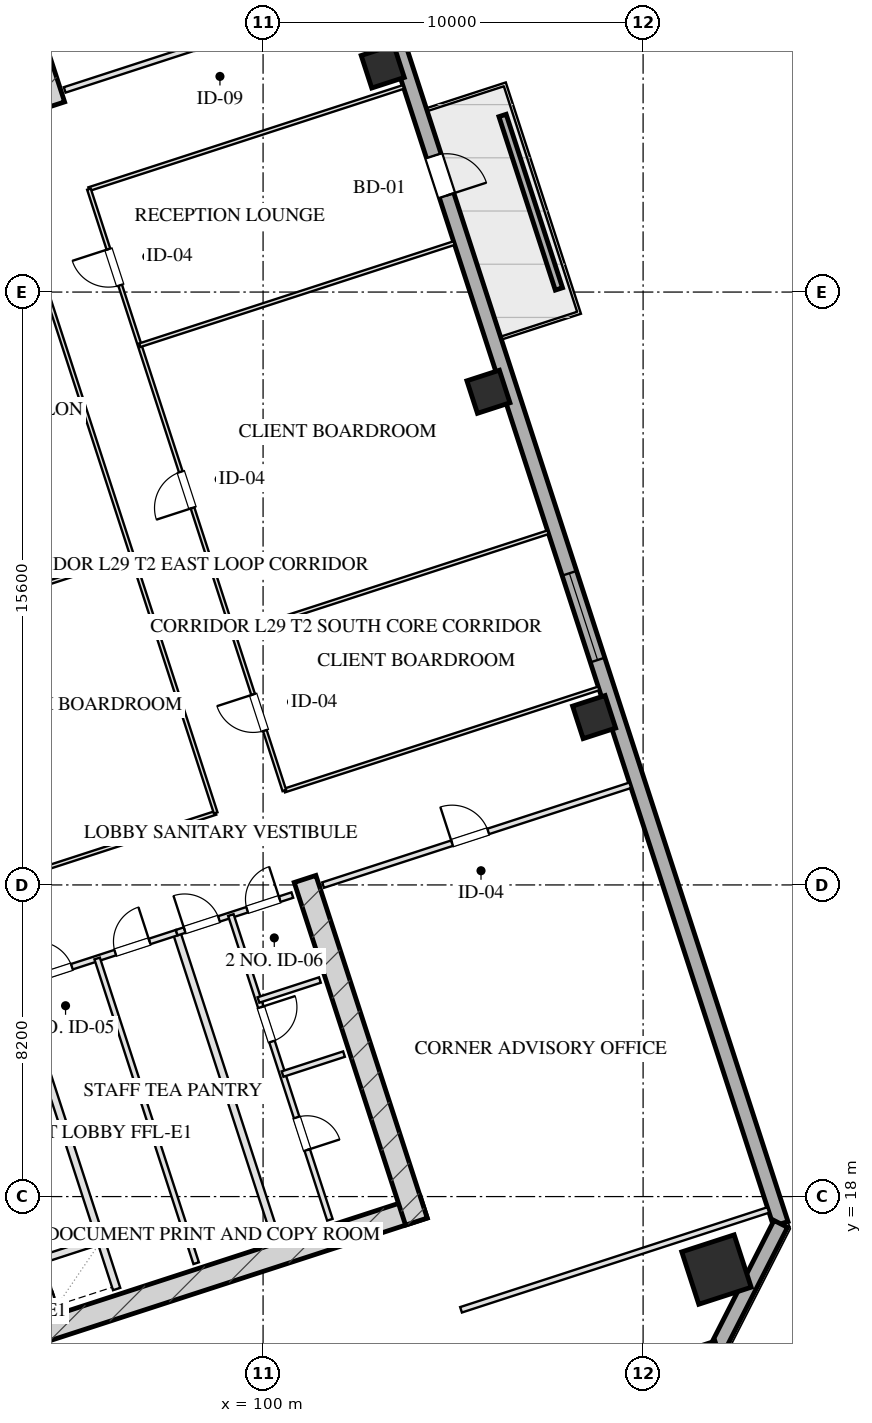
"""IFC4 building model, lengths in metres.
Left out: names, types, materials, properties, quantities, classifications, styles, units other than length and angle.
Written with IfcOpenShell. Run it as: python <this file> out.ifc"""

import sys

from ifc_helpers import new_model, si_unit, direction, frame, frame_2d, origin, origin_2d, place, context, subcontext, project, spatial, rectangle, hollow_rectangle, extrude, element, fill, save


model = new_model("IFC4")
c1 = context("Model", 3, precision=1e-05, world=origin(), true_north=direction((0.0, 1.0)))
c2 = subcontext(c1, "Body", "Model", "MODEL_VIEW")
j1 = project(units=[si_unit("LENGTHUNIT", "METRE"), si_unit("PLANEANGLEUNIT", "RADIAN")], contexts=[c1])
p1 = place(None, origin())
s1 = spatial("IfcSite", under=j1, at=p1, CompositionType="ELEMENT")
p2 = place(p1, origin())
s2 = spatial("IfcBuilding", under=s1, at=p2, CompositionType="ELEMENT")
p3 = place(p2, frame((0.0, 0.0, 113.85)))
s3 = spatial("IfcBuildingStorey", under=s2, at=p3, CompositionType="ELEMENT", Elevation=113.85)
p4 = place(p3, frame((88.63, 12.652, 0.0), z_axis=(0.0, 0.0, 1.0), x_axis=(0.95105714907, 0.309015046886, 0.0)))
e1 = element("IfcWall", 1, at=p4, inside=s3, PredefinedType="SHEAR", context=c2, shape_type="SweptSolid", body=[
    extrude(rectangle(XDim=16.4, YDim=0.6, at=frame_2d((8.2, 0.0))), origin(), (0.0, 0.0, 1.0), 3.45),
])
for number, where, z_axis, x_axis in (
    (2, (101.105, 26.358, 0.0), (0.0, 0.0, 1.0), (0.309, -0.951, 0.0)),
    (3, (94.492, 46.71, 0.0), (0.0, 0.0, 1.0), (-0.309, 0.951, 0.0)),
):
    element("IfcWall", number, at=place(p3, frame(where, z_axis=z_axis, x_axis=x_axis)), inside=s3, PredefinedType="SHEAR", context=c2, shape_type="SweptSolid", body=[
        extrude(rectangle(XDim=9.48, YDim=0.6, at=frame_2d((4.74, 0.0))), origin(), (0.0, 0.0, 1.0), 3.45),
    ])
p5 = place(p3, frame((111.931, 16.08, 0.0), z_axis=(0.0, 0.0, 1.0), x_axis=(0.951056516295, 0.309016994375, 0.0)))
e4 = element("IfcColumn", 4, at=p5, inside=s3, PredefinedType="COLUMN", context=c2, shape_type="SweptSolid", body=[
    extrude(hollow_rectangle(XDim=1.45, YDim=1.45, WallThickness=0.05, at=origin_2d()), origin(), (0.0, 0.0, 1.0), 3.451),
])
for number, where, z_axis, x_axis in (
    (5, (108.711, 30.616, 0.0), (0.0, 0.0, 1.0), (0.951, 0.309, 0.0)),
    (6, (105.93, 39.176, 0.0), (0.0, 0.0, 1.0), (0.951, 0.309, 0.0)),
    (7, (103.149, 47.736, 0.0), (0.0, 0.0, 1.0), (0.951, 0.309, 0.0)),
):
    element("IfcColumn", number, at=place(p3, frame(where, z_axis=z_axis, x_axis=x_axis)), inside=s3, PredefinedType="COLUMN", context=c2, shape_type="SweptSolid", body=[
        extrude(hollow_rectangle(XDim=0.9, YDim=0.9, WallThickness=0.032, at=origin_2d()), origin(), (0.0, 0.0, 1.0), 3.451),
    ])
p6 = place(p3, frame((99.284, 61.41, 0.0), z_axis=(0.0, 0.0, 1.0), x_axis=(0.309017542002, -0.95105633836, 0.0)))
e8 = element("IfcWall", 8, at=p6, inside=s3, PredefinedType="SOLIDWALL", context=c2, shape_type="SweptSolid", body=[
    extrude(rectangle(XDim=46.4, YDim=0.4, at=frame_2d((23.2, 0.0))), origin(), (0.0, 0.0, 1.0), 2.61),
])
p7 = place(p6, frame((28.4, 0.0, 0.75)))
e9 = element("IfcOpeningElement", 9, at=p7, cuts=e8, PredefinedType="OPENING", context=c2, shape_type="SweptSolid", body=[
    extrude(rectangle(XDim=2.4, YDim=1.46, at=frame_2d((1.2, 0.73))), frame((0.0, 0.21, 0.0), z_axis=(0.0, -1.0, 0.0), x_axis=(1.0, 0.0, 0.0)), (0.0, 0.0, 1.0), 0.42),
])
p8 = place(p6, frame((16.85, 0.0, 0.0)))
e10 = element("IfcOpeningElement", 10, at=p8, cuts=e8, PredefinedType="OPENING", context=c2, shape_type="SweptSolid", body=[
    extrude(rectangle(XDim=1.1, YDim=2.15, at=frame_2d((0.55, 1.075))), frame((0.0, 0.21, 0.0), z_axis=(0.0, -1.0, 0.0), x_axis=(1.0, 0.0, 0.0)), (0.0, 0.0, 1.0), 0.42),
])
p9 = place(p3, frame((113.623, 17.281, 0.0), z_axis=(0.0, 0.0, 1.0), x_axis=(-0.454026238093, -0.890988313685, 0.0)))
e11 = element("IfcWall", 11, at=p9, inside=s3, PredefinedType="SOLIDWALL", context=c2, shape_type="SweptSolid", body=[
    extrude(rectangle(XDim=3.677, YDim=0.4, at=frame_2d((1.838, 0.0))), origin(), (0.0, 0.0, 1.0), 2.61),
])
p10 = place(p3, frame((111.953, 14.005, 0.0), z_axis=(0.0, 0.0, 1.0), x_axis=(-0.95105505922, -0.309021478754, 0.0)))
e12 = element("IfcWall", 12, at=p10, inside=s3, PredefinedType="SOLIDWALL", context=c2, shape_type="SweptSolid", body=[
    extrude(rectangle(XDim=29.4, YDim=0.4, at=frame_2d((14.7, 0.0))), origin(), (0.0, 0.0, 1.0), 2.61),
])
p11 = place(p3, frame((107.785, 41.882, 0.0), z_axis=(0.0, 0.0, 1.0), x_axis=(-0.309032019345, 0.951051634255, 0.0)))
e13 = element("IfcWall", 13, at=p11, inside=s3, PredefinedType="PARAPET", context=c2, shape_type="SweptSolid", body=[
    extrude(rectangle(XDim=4.8, YDim=0.2, at=frame_2d((2.4, 0.0))), origin(), (0.0, 0.0, 1.0), 0.75),
])
p12 = place(p3, frame((93.542, 23.585, 0.0), z_axis=(0.0, 0.0, 1.0), x_axis=(0.309042196757, -0.951048327176, 0.0)))
e14 = element("IfcWall", 14, at=p12, inside=s3, PredefinedType="PARTITIONING", context=c2, shape_type="SweptSolid", body=[
    extrude(rectangle(XDim=8.43, YDim=0.2, at=frame_2d((4.215, 0.0))), origin(), (0.0, 0.0, 1.0), 3.175),
])
p13 = place(p3, frame((93.457, 18.247, 0.0), z_axis=(0.0, 0.0, 1.0), x_axis=(0.3089935693, -0.951064127245, 0.0)))
e15 = element("IfcWall", 15, at=p13, inside=s3, PredefinedType="PARTITIONING", context=c2, shape_type="SweptSolid", body=[
    extrude(rectangle(XDim=3.7, YDim=0.2, at=frame_2d((1.85, 0.0))), origin(), (0.0, 0.0, 1.0), 3.175),
])
p14 = place(p3, frame((94.084, 16.317, 0.0), z_axis=(0.0, 0.0, 1.0), x_axis=(0.951041328149, 0.309063734775, 0.0)))
e16 = element("IfcWall", 16, at=p14, inside=s3, PredefinedType="PARTITIONING", context=c2, shape_type="SweptSolid", body=[
    extrude(rectangle(XDim=1.73, YDim=0.2, at=frame_2d((0.865, 0.0))), origin(), (0.0, 0.0, 1.0), 3.175),
])
p15 = place(p3, frame((97.727, 24.944, 0.0), z_axis=(0.0, 0.0, 1.0), x_axis=(0.309016001439, -0.951056838919, 0.0)))
e17 = element("IfcWall", 17, at=p15, inside=s3, PredefinedType="PARTITIONING", context=c2, shape_type="SweptSolid", body=[
    extrude(rectangle(XDim=8.43, YDim=0.2, at=frame_2d((4.215, 0.0))), origin(), (0.0, 0.0, 1.0), 3.175),
])
p16 = place(p3, frame((93.542, 23.585, 0.0), z_axis=(0.0, 0.0, 1.0), x_axis=(0.951063829732, 0.308994485023, 0.0)))
e18 = element("IfcWall", 18, at=p16, inside=s3, PredefinedType="PARTITIONING", context=c2, shape_type="SweptSolid", body=[
    extrude(rectangle(XDim=4.4, YDim=0.15, at=frame_2d((2.2, 0.0))), origin(), (0.0, 0.0, 1.0), 3.175),
])
p17 = place(p16, frame((0.55, 0.0, 0.0)))
e19 = element("IfcOpeningElement", 19, at=p17, cuts=e18, PredefinedType="OPENING", context=c2, shape_type="SweptSolid", body=[
    extrude(rectangle(XDim=0.95, YDim=2.05, at=frame_2d((0.475, 1.025))), frame((0.0, 0.085, 0.0), z_axis=(0.0, -1.0, 0.0), x_axis=(1.0, 0.0, 0.0)), (0.0, 0.0, 1.0), 0.17),
])
p18 = place(p16, frame((2.7, 0.0, 0.0)))
e20 = element("IfcOpeningElement", 20, at=p18, cuts=e18, PredefinedType="OPENING", context=c2, shape_type="SweptSolid", body=[
    extrude(rectangle(XDim=0.95, YDim=2.05, at=frame_2d((0.475, 1.025))), frame((0.0, 0.085, 0.0), z_axis=(0.0, -1.0, 0.0), x_axis=(1.0, 0.0, 0.0)), (0.0, 0.0, 1.0), 0.17),
])
p19 = place(p3, frame((95.634, 24.265, 0.0), z_axis=(0.0, 0.0, 1.0), x_axis=(0.309007490203, -0.951059604335, 0.0)))
e21 = element("IfcWall", 21, at=p19, inside=s3, PredefinedType="PARTITIONING", context=c2, shape_type="SweptSolid", body=[
    extrude(rectangle(XDim=8.43, YDim=0.15, at=frame_2d((4.215, 0.0))), origin(), (0.0, 0.0, 1.0), 3.175),
])
p20 = place(p3, frame((97.727, 24.944, 0.0), z_axis=(0.0, 0.0, 1.0), x_axis=(0.951036872128, 0.309077446369, 0.0)))
e22 = element("IfcWall", 22, at=p20, inside=s3, PredefinedType="PARTITIONING", context=c2, shape_type="SweptSolid", body=[
    extrude(rectangle(XDim=3.2, YDim=0.15, at=frame_2d((1.6, 0.0))), origin(), (0.0, 0.0, 1.0), 3.175),
])
p21 = place(p20, frame((0.22, 0.0, 0.0)))
e23 = element("IfcOpeningElement", 23, at=p21, cuts=e22, PredefinedType="OPENING", context=c2, shape_type="SweptSolid", body=[
    extrude(rectangle(XDim=0.95, YDim=2.05, at=frame_2d((0.475, 1.025))), frame((0.0, 0.085, 0.0), z_axis=(0.0, -1.0, 0.0), x_axis=(1.0, 0.0, 0.0)), (0.0, 0.0, 1.0), 0.17),
])
p22 = place(p20, frame((1.95, 0.0, 0.0)))
e24 = element("IfcOpeningElement", 24, at=p22, cuts=e22, PredefinedType="OPENING", context=c2, shape_type="SweptSolid", body=[
    extrude(rectangle(XDim=0.9, YDim=2.05, at=frame_2d((0.45, 1.025))), frame((0.0, 0.085, 0.0), z_axis=(0.0, -1.0, 0.0), x_axis=(1.0, 0.0, 0.0)), (0.0, 0.0, 1.0), 0.17),
])
p23 = place(p3, frame((99.153, 25.408, 0.0), z_axis=(0.0, 0.0, 1.0), x_axis=(0.309016001439, -0.951056838919, 0.0)))
e25 = element("IfcWall", 25, at=p23, inside=s3, PredefinedType="PARTITIONING", context=c2, shape_type="SweptSolid", body=[
    extrude(rectangle(XDim=8.43, YDim=0.15, at=frame_2d((4.215, 0.0))), origin(), (0.0, 0.0, 1.0), 3.175),
])
p24 = place(p23, frame((2.55, 0.0, 0.0)))
e26 = element("IfcOpeningElement", 26, at=p24, cuts=e25, PredefinedType="OPENING", context=c2, shape_type="SweptSolid", body=[
    extrude(rectangle(XDim=0.95, YDim=2.05, at=frame_2d((0.475, 1.025))), frame((0.0, 0.085, 0.0), z_axis=(0.0, -1.0, 0.0), x_axis=(1.0, 0.0, 0.0)), (0.0, 0.0, 1.0), 0.17),
])
p25 = place(p23, frame((5.6, 0.0, 0.0)))
e27 = element("IfcOpeningElement", 27, at=p25, cuts=e25, PredefinedType="OPENING", context=c2, shape_type="SweptSolid", body=[
    extrude(rectangle(XDim=0.9, YDim=2.05, at=frame_2d((0.45, 1.025))), frame((0.0, 0.085, 0.0), z_axis=(0.0, -1.0, 0.0), x_axis=(1.0, 0.0, 0.0)), (0.0, 0.0, 1.0), 0.17),
])
for number, where, z_axis, x_axis in (
    (28, (100.513, 21.223, 0.0), (0.0, 0.0, 1.0), (0.951, 0.309, 0.0)),
    (29, (99.879, 23.173, 0.0), (0.0, 0.0, 1.0), (0.951, 0.309, 0.0)),
):
    element("IfcWall", number, at=place(p3, frame(where, z_axis=z_axis, x_axis=x_axis)), inside=s3, PredefinedType="PARTITIONING", context=c2, shape_type="SweptSolid", body=[
        extrude(rectangle(XDim=1.7, YDim=0.15, at=frame_2d((0.85, 0.0))), origin(), (0.0, 0.0, 1.0), 3.175),
    ])
p26 = place(p3, frame((105.209, 15.021, 0.0), z_axis=(0.0, 0.0, 1.0), x_axis=(0.951054329824, 0.309023723562, 0.0)))
e30 = element("IfcWall", 30, at=p26, inside=s3, PredefinedType="PARTITIONING", context=c2, shape_type="SweptSolid", body=[
    extrude(rectangle(XDim=8.5, YDim=0.15, at=frame_2d((4.25, 0.0))), origin(), (0.0, 0.0, 1.0), 3.175),
])
p27 = place(p3, frame((101.578, 26.196, 0.0), z_axis=(0.0, 0.0, 1.0), x_axis=(0.951062770994, 0.308997743729, 0.0)))
e31 = element("IfcWall", 31, at=p27, inside=s3, PredefinedType="PARTITIONING", context=c2, shape_type="SweptSolid", body=[
    extrude(rectangle(XDim=8.5, YDim=0.15, at=frame_2d((4.25, 0.0))), origin(), (0.0, 0.0, 1.0), 3.175),
])
p28 = place(p27, frame((3.57, 0.0, 0.0)))
e32 = element("IfcOpeningElement", 32, at=p28, cuts=e31, PredefinedType="OPENING", context=c2, shape_type="SweptSolid", body=[
    extrude(rectangle(XDim=1.0, YDim=2.05, at=frame_2d((0.5, 1.025))), frame((0.0, 0.085, 0.0), z_axis=(0.0, -1.0, 0.0), x_axis=(1.0, 0.0, 0.0)), (0.0, 0.0, 1.0), 0.17),
])
p29 = place(p3, frame((94.78, 47.119, 0.0), z_axis=(0.0, 0.0, 1.0), x_axis=(0.951054329824, 0.309023723562, 0.0)))
e33 = element("IfcWall", 33, at=p29, inside=s3, PredefinedType="PARTITIONING", context=c2, shape_type="SweptSolid", body=[
    extrude(rectangle(XDim=8.5, YDim=0.15, at=frame_2d((4.25, 0.0))), origin(), (0.0, 0.0, 1.0), 3.175),
])
p30 = place(p29, frame((3.57, 0.0, 0.0)))
e34 = element("IfcOpeningElement", 34, at=p30, cuts=e33, PredefinedType="OPENING", context=c2, shape_type="SweptSolid", body=[
    extrude(rectangle(XDim=0.85, YDim=2.05, at=frame_2d((0.425, 1.025))), frame((0.0, 0.085, 0.0), z_axis=(0.0, -1.0, 0.0), x_axis=(1.0, 0.0, 0.0)), (0.0, 0.0, 1.0), 0.17),
])
p31 = place(p3, frame((91.24, 25.655, 0.0), z_axis=(0.0, 0.0, 1.0), x_axis=(0.951060182336, 0.309005711233, 0.0)))
e35 = element("IfcWall", 35, at=p31, inside=s3, PredefinedType="MOVABLE", context=c2, shape_type="SweptSolid", body=[
    extrude(rectangle(XDim=7.9, YDim=0.1, at=frame_2d((3.95, 0.0))), origin(), (0.0, 0.0, 1.0), 3.175),
])
for number, where, z_axis, x_axis in (
    (36, (100.56, 28.683, 0.0), (0.0, 0.0, 1.0), (0.951, 0.309, 0.0)),
    (37, (95.418, 44.509, 0.0), (0.0, 0.0, 1.0), (0.951, 0.309, 0.0)),
):
    element("IfcWall", number, at=place(p3, frame(where, z_axis=z_axis, x_axis=x_axis)), inside=s3, PredefinedType="MOVABLE", context=c2, shape_type="SweptSolid", body=[
        extrude(rectangle(XDim=8.7, YDim=0.1, at=frame_2d((4.35, 0.0))), origin(), (0.0, 0.0, 1.0), 3.175),
    ])
p32 = place(p3, frame((98.753, 28.096, 0.0), z_axis=(0.0, 0.0, 1.0), x_axis=(-0.30901773025, 0.951056277195, 0.0)))
e38 = element("IfcWall", 38, at=p32, inside=s3, PredefinedType="MOVABLE", context=c2, shape_type="SweptSolid", body=[
    extrude(rectangle(XDim=16.64, YDim=0.1, at=frame_2d((8.32, 0.0))), origin(), (0.0, 0.0, 1.0), 3.175),
])
p33 = place(p3, frame((100.56, 28.683, 0.0), z_axis=(0.0, 0.0, 1.0), x_axis=(-0.309004459387, 0.951060589068, 0.0)))
e39 = element("IfcWall", 39, at=p33, inside=s3, PredefinedType="MOVABLE", context=c2, shape_type="SweptSolid", body=[
    extrude(rectangle(XDim=16.64, YDim=0.1, at=frame_2d((8.32, 0.0))), origin(), (0.0, 0.0, 1.0), 3.175),
])
p34 = place(p33, frame((1.66, 0.0, 0.0)))
e40 = element("IfcOpeningElement", 40, at=p34, cuts=e39, PredefinedType="OPENING", context=c2, shape_type="SweptSolid", body=[
    extrude(rectangle(XDim=1.0, YDim=2.05, at=frame_2d((0.5, 1.025))), frame((0.0, 0.06, 0.0), z_axis=(0.0, -1.0, 0.0), x_axis=(1.0, 0.0, 0.0)), (0.0, 0.0, 1.0), 0.12),
])
p35 = place(p33, frame((7.82, 0.0, 0.0)))
e41 = element("IfcOpeningElement", 41, at=p35, cuts=e39, PredefinedType="OPENING", context=c2, shape_type="SweptSolid", body=[
    extrude(rectangle(XDim=1.0, YDim=2.05, at=frame_2d((0.5, 1.025))), frame((0.0, 0.06, 0.0), z_axis=(0.0, -1.0, 0.0), x_axis=(1.0, 0.0, 0.0)), (0.0, 0.0, 1.0), 0.12),
])
p36 = place(p33, frame((13.98, 0.0, 0.0)))
e42 = element("IfcOpeningElement", 42, at=p36, cuts=e39, PredefinedType="OPENING", context=c2, shape_type="SweptSolid", body=[
    extrude(rectangle(XDim=1.0, YDim=2.05, at=frame_2d((0.5, 1.025))), frame((0.0, 0.06, 0.0), z_axis=(0.0, -1.0, 0.0), x_axis=(1.0, 0.0, 0.0)), (0.0, 0.0, 1.0), 0.12),
])
p37 = place(p3, frame((89.039, 32.426, 0.0), z_axis=(0.0, 0.0, 1.0), x_axis=(0.951051099951, 0.309033663672, 0.0)))
e43 = element("IfcWall", 43, at=p37, inside=s3, PredefinedType="MOVABLE", context=c2, shape_type="SweptSolid", body=[
    extrude(rectangle(XDim=7.9, YDim=0.1, at=frame_2d((3.95, 0.0))), origin(), (0.0, 0.0, 1.0), 3.175),
])
p38 = place(p3, frame((99.225, 32.792, 0.0), z_axis=(0.0, 0.0, 1.0), x_axis=(0.951055307445, 0.309020714809, 0.0)))
e44 = element("IfcWall", 44, at=p38, inside=s3, PredefinedType="MOVABLE", context=c2, shape_type="SweptSolid", body=[
    extrude(rectangle(XDim=8.7, YDim=0.1, at=frame_2d((4.35, 0.0))), origin(), (0.0, 0.0, 1.0), 3.175),
])
p39 = place(p3, frame((96.753, 40.4, 0.0), z_axis=(0.0, 0.0, 1.0), x_axis=(0.951057987102, 0.309012467661, 0.0)))
e45 = element("IfcWall", 45, at=p39, inside=s3, PredefinedType="MOVABLE", context=c2, shape_type="SweptSolid", body=[
    extrude(rectangle(XDim=8.7, YDim=0.1, at=frame_2d((4.35, 0.0))), origin(), (0.0, 0.0, 1.0), 3.175),
])
p40 = place(p7, origin())
e46 = element("IfcWindow", 46, at=p40, inside=s3, PartitioningType="TRIPLE_PANEL_VERTICAL", PredefinedType="WINDOW", context=c2, shape_type="SweptSolid", body=[
    extrude(rectangle(XDim=2.4, YDim=1.46, at=frame_2d((1.2, 0.73))), frame((0.0, 0.03, 0.0), z_axis=(0.0, -1.0, 0.0), x_axis=(1.0, 0.0, 0.0)), (0.0, 0.0, 1.0), 0.06),
])
fill(e9, e46)
p41 = place(p8, origin())
e47 = element("IfcDoor", 47, at=p41, inside=s3, OperationType="SINGLE_SWING_RIGHT", PredefinedType="DOOR", context=c2, shape_type="SweptSolid", body=[
    extrude(rectangle(XDim=1.1, YDim=2.15, at=frame_2d((0.55, 1.075))), frame((0.0, 0.025, 0.0), z_axis=(0.0, -1.0, 0.0), x_axis=(1.0, 0.0, 0.0)), (0.0, 0.0, 1.0), 0.05),
])
fill(e10, e47)
p42 = place(p17, origin())
e48 = element("IfcDoor", 48, at=p42, inside=s3, OperationType="SINGLE_SWING_LEFT", PredefinedType="DOOR", context=c2, shape_type="SweptSolid", body=[
    extrude(rectangle(XDim=0.95, YDim=2.05, at=frame_2d((0.475, 1.025))), frame((0.0, 0.025, 0.0), z_axis=(0.0, -1.0, 0.0), x_axis=(1.0, 0.0, 0.0)), (0.0, 0.0, 1.0), 0.05),
])
fill(e19, e48)
p43 = place(p18, origin())
e49 = element("IfcDoor", 49, at=p43, inside=s3, OperationType="SINGLE_SWING_RIGHT", PredefinedType="DOOR", context=c2, shape_type="SweptSolid", body=[
    extrude(rectangle(XDim=0.95, YDim=2.05, at=frame_2d((0.475, 1.025))), frame((0.0, 0.025, 0.0), z_axis=(0.0, -1.0, 0.0), x_axis=(1.0, 0.0, 0.0)), (0.0, 0.0, 1.0), 0.05),
])
fill(e20, e49)
p44 = place(p21, origin())
e50 = element("IfcDoor", 50, at=p44, inside=s3, OperationType="SINGLE_SWING_LEFT", PredefinedType="DOOR", context=c2, shape_type="SweptSolid", body=[
    extrude(rectangle(XDim=0.95, YDim=2.05, at=frame_2d((0.475, 1.025))), frame((0.0, 0.025, 0.0), z_axis=(0.0, -1.0, 0.0), x_axis=(1.0, 0.0, 0.0)), (0.0, 0.0, 1.0), 0.05),
])
fill(e23, e50)
p45 = place(p22, origin())
e51 = element("IfcDoor", 51, at=p45, inside=s3, OperationType="SINGLE_SWING_RIGHT", PredefinedType="DOOR", context=c2, shape_type="SweptSolid", body=[
    extrude(rectangle(XDim=0.9, YDim=2.05, at=frame_2d((0.45, 1.025))), frame((0.0, 0.025, 0.0), z_axis=(0.0, -1.0, 0.0), x_axis=(1.0, 0.0, 0.0)), (0.0, 0.0, 1.0), 0.05),
])
fill(e24, e51)
p46 = place(p24, origin())
e52 = element("IfcDoor", 52, at=p46, inside=s3, OperationType="SINGLE_SWING_LEFT", PredefinedType="DOOR", context=c2, shape_type="SweptSolid", body=[
    extrude(rectangle(XDim=0.95, YDim=2.05, at=frame_2d((0.475, 1.025))), frame((0.0, 0.025, 0.0), z_axis=(0.0, -1.0, 0.0), x_axis=(1.0, 0.0, 0.0)), (0.0, 0.0, 1.0), 0.05),
])
fill(e26, e52)
p47 = place(p25, origin())
e53 = element("IfcDoor", 53, at=p47, inside=s3, OperationType="SINGLE_SWING_RIGHT", PredefinedType="DOOR", context=c2, shape_type="SweptSolid", body=[
    extrude(rectangle(XDim=0.9, YDim=2.05, at=frame_2d((0.45, 1.025))), frame((0.0, 0.025, 0.0), z_axis=(0.0, -1.0, 0.0), x_axis=(1.0, 0.0, 0.0)), (0.0, 0.0, 1.0), 0.05),
])
fill(e27, e53)
p48 = place(p28, origin())
e54 = element("IfcDoor", 54, at=p48, inside=s3, OperationType="SINGLE_SWING_LEFT", PredefinedType="DOOR", context=c2, shape_type="SweptSolid", body=[
    extrude(rectangle(XDim=1.0, YDim=2.05, at=frame_2d((0.5, 1.025))), frame((0.0, 0.025, 0.0), z_axis=(0.0, -1.0, 0.0), x_axis=(1.0, 0.0, 0.0)), (0.0, 0.0, 1.0), 0.05),
])
fill(e32, e54)
p49 = place(p34, origin())
e55 = element("IfcDoor", 55, at=p49, inside=s3, OperationType="SINGLE_SWING_RIGHT", PredefinedType="DOOR", context=c2, shape_type="SweptSolid", body=[
    extrude(rectangle(XDim=1.0, YDim=2.05, at=frame_2d((0.5, 1.025))), frame((0.0, 0.025, 0.0), z_axis=(0.0, -1.0, 0.0), x_axis=(1.0, 0.0, 0.0)), (0.0, 0.0, 1.0), 0.05),
])
fill(e40, e55)
p50 = place(p35, origin())
e56 = element("IfcDoor", 56, at=p50, inside=s3, OperationType="SINGLE_SWING_LEFT", PredefinedType="DOOR", context=c2, shape_type="SweptSolid", body=[
    extrude(rectangle(XDim=1.0, YDim=2.05, at=frame_2d((0.5, 1.025))), frame((0.0, 0.025, 0.0), z_axis=(0.0, -1.0, 0.0), x_axis=(1.0, 0.0, 0.0)), (0.0, 0.0, 1.0), 0.05),
])
fill(e41, e56)
p51 = place(p36, origin())
e57 = element("IfcDoor", 57, at=p51, inside=s3, OperationType="SINGLE_SWING_RIGHT", PredefinedType="DOOR", context=c2, shape_type="SweptSolid", body=[
    extrude(rectangle(XDim=1.0, YDim=2.05, at=frame_2d((0.5, 1.025))), frame((0.0, 0.025, 0.0), z_axis=(0.0, -1.0, 0.0), x_axis=(1.0, 0.0, 0.0)), (0.0, 0.0, 1.0), 0.05),
])
fill(e42, e57)
save(model, sys.argv[1])
